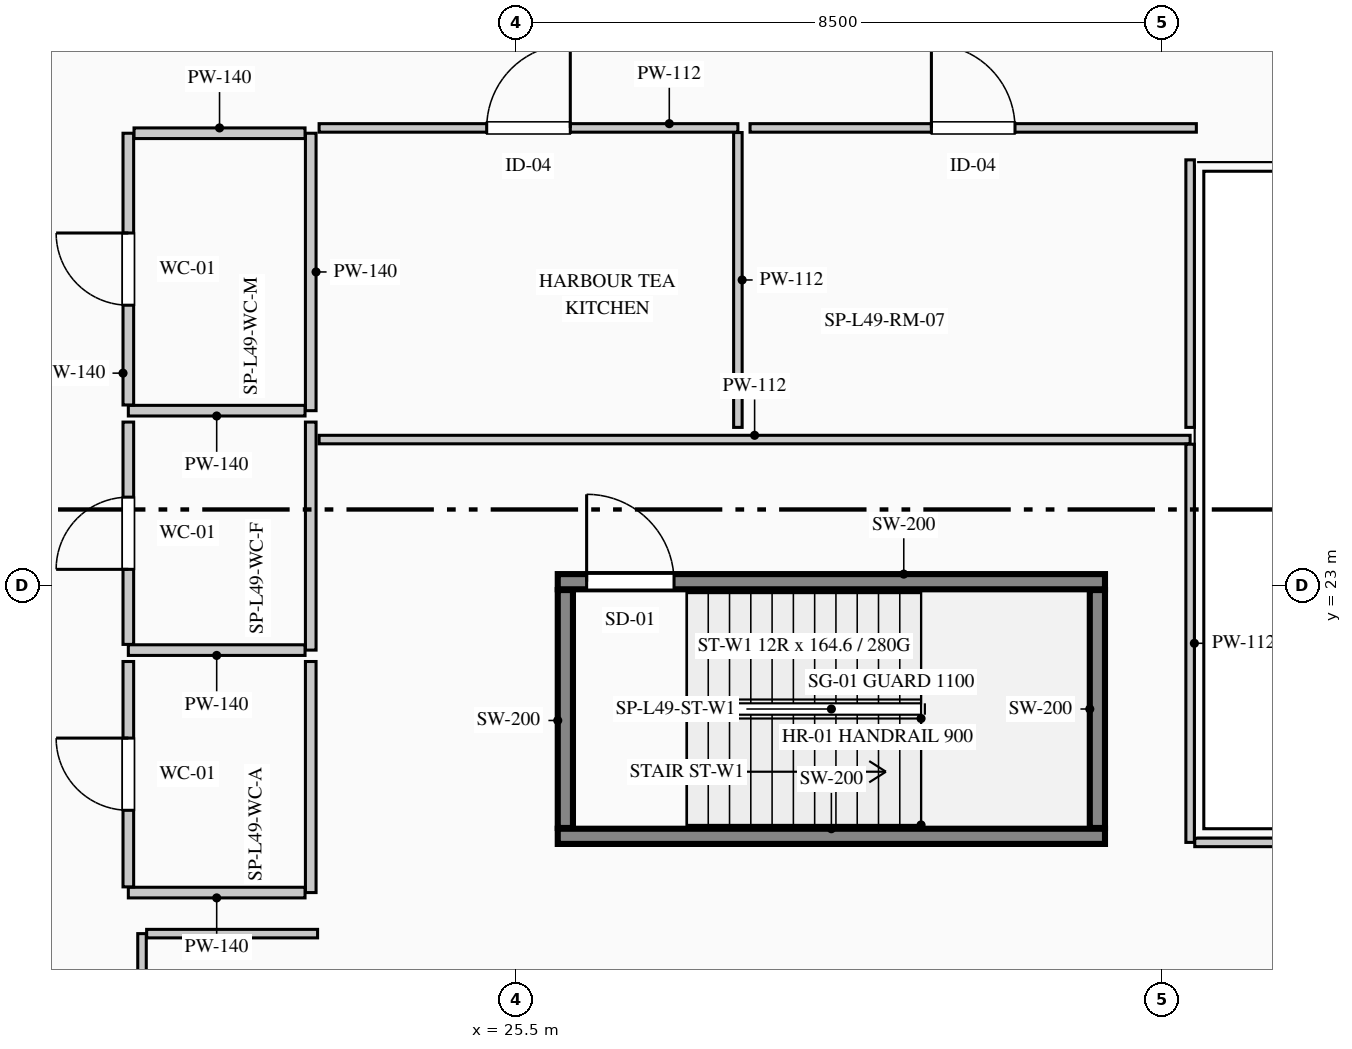
"""IFC4 building model, lengths in metres.
Left out: names, types, materials, properties, quantities, classifications, styles, units other than length and angle.
Written with IfcOpenShell. Run it as: python <this file> out.ifc"""

import sys

from ifc_helpers import new_model, si_unit, direction, frame, frame_2d, origin, place, context, subcontext, project, spatial, rectangle, extrude, element, fill, save


model = new_model("IFC4")
c1 = context("Model", 3, precision=1e-05, world=origin(), true_north=direction((0.0, 1.0)))
c2 = subcontext(c1, "Body", "Model", "MODEL_VIEW")
j1 = project(units=[si_unit("LENGTHUNIT", "METRE"), si_unit("PLANEANGLEUNIT", "RADIAN")], contexts=[c1])
p1 = place(None, origin())
s1 = spatial("IfcSite", under=j1, at=p1, CompositionType="ELEMENT")
p2 = place(p1, origin())
s2 = spatial("IfcBuilding", under=s1, at=p2, CompositionType="ELEMENT")
p3 = place(p2, frame((0.0, 0.0, 207.45)))
s3 = spatial("IfcBuildingStorey", under=s2, at=p3, CompositionType="ELEMENT", Elevation=207.45)
p4 = place(p3, frame((26.05, 19.7, 0.0), z_axis=(0.0, 0.0, 1.0), x_axis=(1.0, 0.0, 0.0)))
e1 = element("IfcWall", 1, at=p4, inside=s3, PredefinedType="SHEAR", context=c2, shape_type="SweptSolid", body=[
    extrude(rectangle(XDim=7.2, YDim=0.2, at=frame_2d((3.6, 0.0))), origin(), (0.0, 0.0, 1.0), 3.95),
])
p5 = place(p3, frame((26.05, 23.05, 0.0), z_axis=(0.0, 0.0, 1.0), x_axis=(1.0, 0.0, 0.0)))
e2 = element("IfcWall", 2, at=p5, inside=s3, PredefinedType="SHEAR", context=c2, shape_type="SweptSolid", body=[
    extrude(rectangle(XDim=7.2, YDim=0.2, at=frame_2d((3.6, 0.0))), origin(), (0.0, 0.0, 1.0), 3.95),
])
p6 = place(p5, frame((0.38, 0.0, 0.0)))
e3 = element("IfcOpeningElement", 3, at=p6, cuts=e2, PredefinedType="OPENING", context=c2, shape_type="SweptSolid", body=[
    extrude(rectangle(XDim=1.15, YDim=2.2, at=frame_2d((0.575, 1.1))), frame((0.0, 0.11, 0.0), z_axis=(0.0, -1.0, 0.0), x_axis=(1.0, 0.0, 0.0)), (0.0, 0.0, 1.0), 0.22),
])
for number, where, z_axis, x_axis in (
    (4, (26.15, 19.81, 0.0), (0.0, 0.0, 1.0), (0.0, 1.0, 0.0)),
    (5, (33.15, 19.81, 0.0), (0.0, 0.0, 1.0), (0.0, 1.0, 0.0)),
):
    element("IfcWall", number, at=place(p3, frame(where, z_axis=z_axis, x_axis=x_axis)), inside=s3, PredefinedType="SHEAR", context=c2, shape_type="SweptSolid", body=[
        extrude(rectangle(XDim=3.13, YDim=0.2, at=frame_2d((1.565, 0.0))), origin(), (0.0, 0.0, 1.0), 3.95),
    ])
p7 = place(p3, frame((22.8, 28.95, 0.0), z_axis=(0.0, 0.0, 1.0), x_axis=(0.0, -1.0, 0.0)))
e6 = element("IfcWall", 6, at=p7, inside=s3, PredefinedType="PARTITIONING", context=c2, shape_type="SweptSolid", body=[
    extrude(rectangle(XDim=3.65, YDim=0.14, at=frame_2d((1.825, 0.0))), origin(), (0.0, 0.0, 1.0), 3.325),
])
p8 = place(p3, frame((22.725, 25.3, 0.0), z_axis=(0.0, 0.0, 1.0), x_axis=(-1.0, 0.0, 0.0)))
e7 = element("IfcWall", 7, at=p8, inside=s3, PredefinedType="PARTITIONING", context=c2, shape_type="SweptSolid", body=[
    extrude(rectangle(XDim=2.325, YDim=0.14, at=frame_2d((1.163, 0.0))), origin(), (0.0, 0.0, 1.0), 3.7),
])
p9 = place(p3, frame((20.4, 25.375, 0.0), z_axis=(0.0, 0.0, 1.0), x_axis=(0.0, 1.0, 0.0)))
e8 = element("IfcWall", 8, at=p9, inside=s3, PredefinedType="PARTITIONING", context=c2, shape_type="SweptSolid", body=[
    extrude(rectangle(XDim=3.575, YDim=0.14, at=frame_2d((1.788, 0.0))), origin(), (0.0, 0.0, 1.0), 3.7),
])
p10 = place(p9, frame((1.312, 0.0, 0.0)))
e9 = element("IfcOpeningElement", 9, at=p10, cuts=e8, PredefinedType="OPENING", context=c2, shape_type="SweptSolid", body=[
    extrude(rectangle(XDim=0.95, YDim=2.15, at=frame_2d((0.475, 1.075))), frame((0.0, 0.08, 0.0), z_axis=(0.0, -1.0, 0.0), x_axis=(1.0, 0.0, 0.0)), (0.0, 0.0, 1.0), 0.16),
])
p11 = place(p3, frame((20.475, 28.95, 0.0), z_axis=(0.0, 0.0, 1.0), x_axis=(1.0, 0.0, 0.0)))
e10 = element("IfcWall", 10, at=p11, inside=s3, PredefinedType="PARTITIONING", context=c2, shape_type="SweptSolid", body=[
    extrude(rectangle(XDim=2.25, YDim=0.14, at=frame_2d((1.125, 0.0))), origin(), (0.0, 0.0, 1.0), 3.7),
])
p12 = place(p3, frame((22.8, 25.15, 0.0), z_axis=(0.0, 0.0, 1.0), x_axis=(0.0, -1.0, 0.0)))
e11 = element("IfcWall", 11, at=p12, inside=s3, PredefinedType="PARTITIONING", context=c2, shape_type="SweptSolid", body=[
    extrude(rectangle(XDim=3.0, YDim=0.14, at=frame_2d((1.5, 0.0))), origin(), (0.0, 0.0, 1.0), 3.325),
])
p13 = place(p3, frame((22.725, 22.15, 0.0), z_axis=(0.0, 0.0, 1.0), x_axis=(-1.0, 0.0, 0.0)))
e12 = element("IfcWall", 12, at=p13, inside=s3, PredefinedType="PARTITIONING", context=c2, shape_type="SweptSolid", body=[
    extrude(rectangle(XDim=2.325, YDim=0.14, at=frame_2d((1.163, 0.0))), origin(), (0.0, 0.0, 1.0), 3.7),
])
p14 = place(p3, frame((20.4, 22.225, 0.0), z_axis=(0.0, 0.0, 1.0), x_axis=(0.0, 1.0, 0.0)))
e13 = element("IfcWall", 13, at=p14, inside=s3, PredefinedType="PARTITIONING", context=c2, shape_type="SweptSolid", body=[
    extrude(rectangle(XDim=2.925, YDim=0.14, at=frame_2d((1.462, 0.0))), origin(), (0.0, 0.0, 1.0), 3.7),
])
p15 = place(p14, frame((0.988, 0.0, 0.0)))
e14 = element("IfcOpeningElement", 14, at=p15, cuts=e13, PredefinedType="OPENING", context=c2, shape_type="SweptSolid", body=[
    extrude(rectangle(XDim=0.95, YDim=2.15, at=frame_2d((0.475, 1.075))), frame((0.0, 0.08, 0.0), z_axis=(0.0, -1.0, 0.0), x_axis=(1.0, 0.0, 0.0)), (0.0, 0.0, 1.0), 0.16),
])
p16 = place(p3, frame((22.8, 22.0, 0.0), z_axis=(0.0, 0.0, 1.0), x_axis=(0.0, -1.0, 0.0)))
e15 = element("IfcWall", 15, at=p16, inside=s3, PredefinedType="PARTITIONING", context=c2, shape_type="SweptSolid", body=[
    extrude(rectangle(XDim=3.04, YDim=0.14, at=frame_2d((1.52, 0.0))), origin(), (0.0, 0.0, 1.0), 3.325),
])
p17 = place(p3, frame((22.725, 18.96, 0.0), z_axis=(0.0, 0.0, 1.0), x_axis=(-1.0, 0.0, 0.0)))
e16 = element("IfcWall", 16, at=p17, inside=s3, PredefinedType="PARTITIONING", context=c2, shape_type="SweptSolid", body=[
    extrude(rectangle(XDim=2.325, YDim=0.14, at=frame_2d((1.163, 0.0))), origin(), (0.0, 0.0, 1.0), 3.7),
])
p18 = place(p3, frame((20.4, 19.035, 0.0), z_axis=(0.0, 0.0, 1.0), x_axis=(0.0, 1.0, 0.0)))
e17 = element("IfcWall", 17, at=p18, inside=s3, PredefinedType="PARTITIONING", context=c2, shape_type="SweptSolid", body=[
    extrude(rectangle(XDim=2.965, YDim=0.14, at=frame_2d((1.482, 0.0))), origin(), (0.0, 0.0, 1.0), 3.7),
])
p19 = place(p18, frame((1.008, 0.0, 0.0)))
e18 = element("IfcOpeningElement", 18, at=p19, cuts=e17, PredefinedType="OPENING", context=c2, shape_type="SweptSolid", body=[
    extrude(rectangle(XDim=0.95, YDim=2.15, at=frame_2d((0.475, 1.075))), frame((0.0, 0.08, 0.0), z_axis=(0.0, -1.0, 0.0), x_axis=(1.0, 0.0, 0.0)), (0.0, 0.0, 1.0), 0.16),
])
p20 = place(p3, frame((20.58, 12.861, 0.0), z_axis=(0.0, 0.0, 1.0), x_axis=(0.0, 1.0, 0.0)))
e19 = element("IfcWall", 19, at=p20, inside=s3, PredefinedType="PARTITIONING", context=c2, shape_type="SweptSolid", body=[
    extrude(rectangle(XDim=5.559, YDim=0.112, at=frame_2d((2.779, 0.0))), origin(), (0.0, 0.0, 1.0), 3.7),
])
p21 = place(p20, frame((2.229, 0.0, 0.0)))
e20 = element("IfcOpeningElement", 20, at=p21, cuts=e19, PredefinedType="OPENING", context=c2, shape_type="SweptSolid", body=[
    extrude(rectangle(XDim=1.1, YDim=2.2, at=frame_2d((0.55, 1.1))), frame((0.0, 0.066, 0.0), z_axis=(0.0, -1.0, 0.0), x_axis=(1.0, 0.0, 0.0)), (0.0, 0.0, 1.0), 0.132),
])
p22 = place(p3, frame((20.641, 18.42, 0.0), z_axis=(0.0, 0.0, 1.0), x_axis=(1.0, 0.0, 0.0)))
e21 = element("IfcWall", 21, at=p22, inside=s3, PredefinedType="PARTITIONING", context=c2, shape_type="SweptSolid", body=[
    extrude(rectangle(XDim=2.249, YDim=0.112, at=frame_2d((1.125, 0.0))), origin(), (0.0, 0.0, 1.0), 3.7),
])
p23 = place(p3, frame((22.91, 24.92, 0.0), z_axis=(0.0, 0.0, 1.0), x_axis=(1.0, 0.0, 0.0)))
e22 = element("IfcWall", 22, at=p23, inside=s3, PredefinedType="PARTITIONING", context=c2, shape_type="SweptSolid", body=[
    extrude(rectangle(XDim=11.46, YDim=0.112, at=frame_2d((5.73, 0.0))), origin(), (0.0, 0.0, 1.0), 3.325),
])
p24 = place(p3, frame((34.37, 24.859, 0.0), z_axis=(0.0, 0.0, 1.0), x_axis=(0.0, -1.0, 0.0)))
e23 = element("IfcWall", 23, at=p24, inside=s3, PredefinedType="PARTITIONING", context=c2, shape_type="SweptSolid", body=[
    extrude(rectangle(XDim=5.239, YDim=0.112, at=frame_2d((2.619, 0.0))), origin(), (0.0, 0.0, 1.0), 3.7),
])
p25 = place(p3, frame((34.431, 19.62, 0.0), z_axis=(0.0, 0.0, 1.0), x_axis=(1.0, 0.0, 0.0)))
e24 = element("IfcWall", 24, at=p25, inside=s3, PredefinedType="PARTITIONING", context=c2, shape_type="SweptSolid", body=[
    extrude(rectangle(XDim=2.989, YDim=0.112, at=frame_2d((1.495, 0.0))), origin(), (0.0, 0.0, 1.0), 3.7),
])
p26 = place(p3, frame((22.91, 29.02, 0.0), z_axis=(0.0, 0.0, 1.0), x_axis=(1.0, 0.0, 0.0)))
e25 = element("IfcWall", 25, at=p26, inside=s3, PredefinedType="PARTITIONING", context=c2, shape_type="SweptSolid", body=[
    extrude(rectangle(XDim=5.51, YDim=0.112, at=frame_2d((2.755, 0.0))), origin(), (0.0, 0.0, 1.0), 3.485),
])
p27 = place(p26, frame((2.205, 0.0, 0.0)))
e26 = element("IfcOpeningElement", 26, at=p27, cuts=e25, PredefinedType="OPENING", context=c2, shape_type="SweptSolid", body=[
    extrude(rectangle(XDim=1.1, YDim=2.2, at=frame_2d((0.55, 1.1))), frame((0.0, 0.066, 0.0), z_axis=(0.0, -1.0, 0.0), x_axis=(1.0, 0.0, 0.0)), (0.0, 0.0, 1.0), 0.132),
])
p28 = place(p3, frame((28.42, 28.959, 0.0), z_axis=(0.0, 0.0, 1.0), x_axis=(0.0, -1.0, 0.0)))
e27 = element("IfcWall", 27, at=p28, inside=s3, PredefinedType="PARTITIONING", context=c2, shape_type="SweptSolid", body=[
    extrude(rectangle(XDim=3.879, YDim=0.112, at=frame_2d((1.939, 0.0))), origin(), (0.0, 0.0, 1.0), 3.7),
])
p29 = place(p3, frame((34.37, 28.6, 0.0), z_axis=(0.0, 0.0, 1.0), x_axis=(0.0, -1.0, 0.0)))
e28 = element("IfcWall", 28, at=p29, inside=s3, PredefinedType="PARTITIONING", context=c2, shape_type="SweptSolid", body=[
    extrude(rectangle(XDim=3.52, YDim=0.112, at=frame_2d((1.76, 0.0))), origin(), (0.0, 0.0, 1.0), 3.7),
])
p30 = place(p3, frame((28.58, 29.02, 0.0), z_axis=(0.0, 0.0, 1.0), x_axis=(1.0, 0.0, 0.0)))
e29 = element("IfcWall", 29, at=p30, inside=s3, PredefinedType="PARTITIONING", context=c2, shape_type="SweptSolid", body=[
    extrude(rectangle(XDim=5.872, YDim=0.112, at=frame_2d((2.936, 0.0))), origin(), (0.0, 0.0, 1.0), 3.485),
])
p31 = place(p30, frame((2.386, 0.0, 0.0)))
e30 = element("IfcOpeningElement", 30, at=p31, cuts=e29, PredefinedType="OPENING", context=c2, shape_type="SweptSolid", body=[
    extrude(rectangle(XDim=1.1, YDim=2.2, at=frame_2d((0.55, 1.1))), frame((0.0, 0.066, 0.0), z_axis=(0.0, -1.0, 0.0), x_axis=(1.0, 0.0, 0.0)), (0.0, 0.0, 1.0), 0.132),
])
p32 = place(p6, origin())
e31 = element("IfcDoor", 31, at=p32, inside=s3, OperationType="SINGLE_SWING_LEFT", PredefinedType="DOOR", context=c2, shape_type="SweptSolid", body=[
    extrude(rectangle(XDim=1.15, YDim=2.2, at=frame_2d((0.575, 1.1))), frame((0.0, 0.025, 0.0), z_axis=(0.0, -1.0, 0.0), x_axis=(1.0, 0.0, 0.0)), (0.0, 0.0, 1.0), 0.05),
])
fill(e3, e31)
p33 = place(p10, origin())
e32 = element("IfcDoor", 32, at=p33, inside=s3, OperationType="SINGLE_SWING_RIGHT", PredefinedType="DOOR", context=c2, shape_type="SweptSolid", body=[
    extrude(rectangle(XDim=0.95, YDim=2.15, at=frame_2d((0.475, 1.075))), frame((0.0, 0.025, 0.0), z_axis=(0.0, -1.0, 0.0), x_axis=(1.0, 0.0, 0.0)), (0.0, 0.0, 1.0), 0.05),
])
fill(e9, e32)
p34 = place(p15, origin())
e33 = element("IfcDoor", 33, at=p34, inside=s3, OperationType="SINGLE_SWING_LEFT", PredefinedType="DOOR", context=c2, shape_type="SweptSolid", body=[
    extrude(rectangle(XDim=0.95, YDim=2.15, at=frame_2d((0.475, 1.075))), frame((0.0, 0.025, 0.0), z_axis=(0.0, -1.0, 0.0), x_axis=(1.0, 0.0, 0.0)), (0.0, 0.0, 1.0), 0.05),
])
fill(e14, e33)
p35 = place(p19, origin())
e34 = element("IfcDoor", 34, at=p35, inside=s3, OperationType="SINGLE_SWING_RIGHT", PredefinedType="DOOR", context=c2, shape_type="SweptSolid", body=[
    extrude(rectangle(XDim=0.95, YDim=2.15, at=frame_2d((0.475, 1.075))), frame((0.0, 0.025, 0.0), z_axis=(0.0, -1.0, 0.0), x_axis=(1.0, 0.0, 0.0)), (0.0, 0.0, 1.0), 0.05),
])
fill(e18, e34)
p36 = place(p27, origin())
e35 = element("IfcDoor", 35, at=p36, inside=s3, OperationType="SINGLE_SWING_RIGHT", PredefinedType="DOOR", context=c2, shape_type="SweptSolid", body=[
    extrude(rectangle(XDim=1.1, YDim=2.2, at=frame_2d((0.55, 1.1))), frame((0.0, 0.025, 0.0), z_axis=(0.0, -1.0, 0.0), x_axis=(1.0, 0.0, 0.0)), (0.0, 0.0, 1.0), 0.05),
])
fill(e26, e35)
p37 = place(p31, origin())
e36 = element("IfcDoor", 36, at=p37, inside=s3, OperationType="SINGLE_SWING_LEFT", PredefinedType="DOOR", context=c2, shape_type="SweptSolid", body=[
    extrude(rectangle(XDim=1.1, YDim=2.2, at=frame_2d((0.55, 1.1))), frame((0.0, 0.025, 0.0), z_axis=(0.0, -1.0, 0.0), x_axis=(1.0, 0.0, 0.0)), (0.0, 0.0, 1.0), 0.05),
])
fill(e30, e36)
save(model, sys.argv[1])
